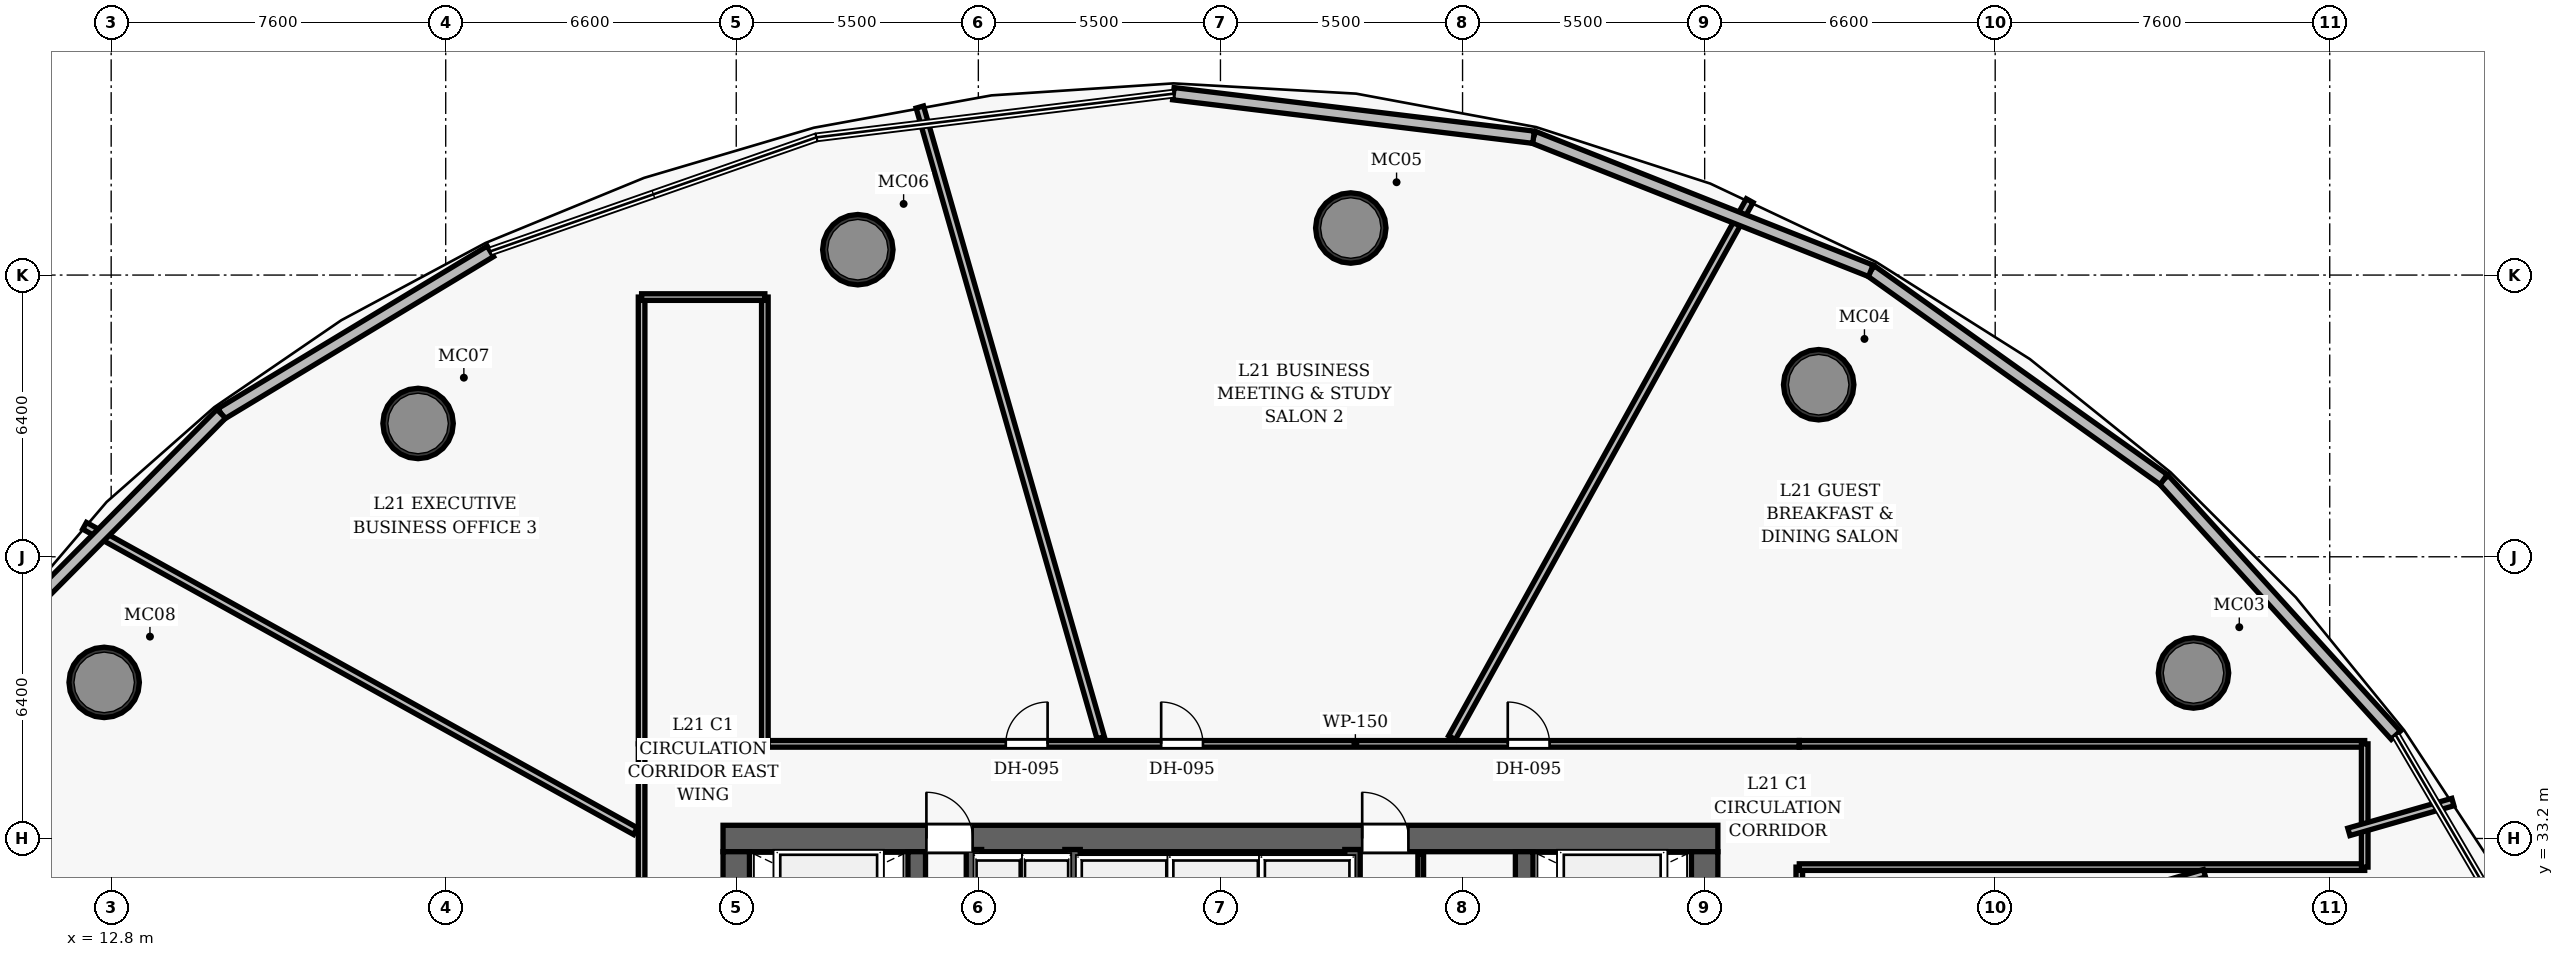
"""IFC4 building model, lengths in metres.
Left out: names, types, materials, properties, quantities, classifications, styles, units other than length and angle.
Written with IfcOpenShell. Run it as: python <this file> out.ifc"""

import sys

from ifc_helpers import new_model, si_unit, direction, frame, frame_2d, origin, origin_2d, place, context, subcontext, project, spatial, rectangle, hollow_circle, extrude, element, fill, save


model = new_model("IFC4")
c1 = context("Model", 3, precision=1e-05, world=origin(), true_north=direction((0.0, 1.0)))
c2 = subcontext(c1, "Body", "Model", "MODEL_VIEW")
j1 = project(units=[si_unit("LENGTHUNIT", "METRE"), si_unit("PLANEANGLEUNIT", "RADIAN")], contexts=[c1])
p1 = place(None, origin())
s1 = spatial("IfcSite", under=j1, at=p1, CompositionType="ELEMENT")
p2 = place(p1, origin())
s2 = spatial("IfcBuilding", under=s1, at=p2, CompositionType="ELEMENT")
p3 = place(p2, frame((0.0, 0.0, 90.4)))
s3 = spatial("IfcBuildingStorey", under=s2, at=p3, CompositionType="ELEMENT", Elevation=90.4)
p4 = place(p3, frame((26.7, 33.2, 0.0), z_axis=(0.0, 0.0, 1.0), x_axis=(1.0, 0.0, 0.0)))
e1 = element("IfcWall", 1, at=p4, inside=s3, PredefinedType="SHEAR", context=c2, shape_type="SweptSolid", body=[
    extrude(rectangle(XDim=22.6, YDim=0.6, at=frame_2d((11.3, 0.0))), origin(), (0.0, 0.0, 1.0), 3.5),
])
p5 = place(p4, frame((4.62, 0.0, 0.0)))
e2 = element("IfcOpeningElement", 2, at=p5, cuts=e1, PredefinedType="OPENING", context=c2, shape_type="SweptSolid", body=[
    extrude(rectangle(XDim=1.05, YDim=2.15, at=frame_2d((0.525, 1.075))), frame((0.0, 0.31, 0.0), z_axis=(0.0, -1.0, 0.0), x_axis=(1.0, 0.0, 0.0)), (0.0, 0.0, 1.0), 0.62),
])
p6 = place(p4, frame((14.52, 0.0, 0.0)))
e3 = element("IfcOpeningElement", 3, at=p6, cuts=e1, PredefinedType="OPENING", context=c2, shape_type="SweptSolid", body=[
    extrude(rectangle(XDim=1.05, YDim=2.15, at=frame_2d((0.525, 1.075))), frame((0.0, 0.31, 0.0), z_axis=(0.0, -1.0, 0.0), x_axis=(1.0, 0.0, 0.0)), (0.0, 0.0, 1.0), 0.62),
])
p7 = place(p3, frame((27.0, 19.1, 0.0), z_axis=(0.0, 0.0, 1.0), x_axis=(0.0, 1.0, 0.0)))
e4 = element("IfcWall", 4, at=p7, inside=s3, PredefinedType="SHEAR", context=c2, shape_type="SweptSolid", body=[
    extrude(rectangle(XDim=13.8, YDim=0.6, at=frame_2d((6.9, 0.0))), origin(), (0.0, 0.0, 1.0), 3.5),
])
p8 = place(p7, frame((8.2, 0.0, 0.0)))
e5 = element("IfcOpeningElement", 5, at=p8, cuts=e4, PredefinedType="OPENING", context=c2, shape_type="SweptSolid", body=[
    extrude(rectangle(XDim=1.05, YDim=2.15, at=frame_2d((0.525, 1.075))), frame((0.0, 0.31, 0.0), z_axis=(0.0, -1.0, 0.0), x_axis=(1.0, 0.0, 0.0)), (0.0, 0.0, 1.0), 0.62),
])
p9 = place(p3, frame((49.0, 19.1, 0.0), z_axis=(0.0, 0.0, 1.0), x_axis=(0.0, 1.0, 0.0)))
e6 = element("IfcWall", 6, at=p9, inside=s3, PredefinedType="SHEAR", context=c2, shape_type="SweptSolid", body=[
    extrude(rectangle(XDim=13.8, YDim=0.6, at=frame_2d((6.9, 0.0))), origin(), (0.0, 0.0, 1.0), 3.5),
])
p10 = place(p9, frame((8.2, 0.0, 0.0)))
e7 = element("IfcOpeningElement", 7, at=p10, cuts=e6, PredefinedType="OPENING", context=c2, shape_type="SweptSolid", body=[
    extrude(rectangle(XDim=1.05, YDim=2.15, at=frame_2d((0.525, 1.075))), frame((0.0, 0.31, 0.0), z_axis=(0.0, -1.0, 0.0), x_axis=(1.0, 0.0, 0.0)), (0.0, 0.0, 1.0), 0.62),
])
for number, where, z_axis, x_axis in (
    (8, (31.1, 19.1, 0.0), (0.0, 0.0, 1.0), (0.0, 1.0, 0.0)),
    (9, (44.9, 19.1, 0.0), (0.0, 0.0, 1.0), (0.0, 1.0, 0.0)),
):
    element("IfcWall", number, at=place(p3, frame(where, z_axis=z_axis, x_axis=x_axis)), inside=s3, PredefinedType="SHEAR", context=c2, shape_type="SweptSolid", body=[
        extrude(rectangle(XDim=13.8, YDim=0.4, at=frame_2d((6.9, 0.0))), origin(), (0.0, 0.0, 1.0), 3.5),
    ])
for number, where, z_axis, x_axis in (
    (10, (60.105, 36.96, 0.0), (0.0, 0.0, 1.0), (1.0, 0.0, 0.0)),
    (11, (51.59, 43.509, 0.0), (0.0, 0.0, 1.0), (1.0, 0.0, 0.0)),
    (12, (40.961, 47.069, 0.0), (0.0, 0.0, 1.0), (1.0, 0.0, 0.0)),
    (13, (29.762, 46.577, 0.0), (0.0, 0.0, 1.0), (1.0, 0.0, 0.0)),
    (14, (19.772, 42.629, 0.0), (0.0, 0.0, 1.0), (1.0, 0.0, 0.0)),
    (15, (12.641, 36.746, 0.0), (0.0, 0.0, 1.0), (1.0, 0.0, 0.0)),
):
    element("IfcColumn", number, at=place(p3, frame(where, z_axis=z_axis, x_axis=x_axis)), inside=s3, PredefinedType="COLUMN", context=c2, shape_type="SweptSolid", body=[
        extrude(hollow_circle(Radius=0.8, WallThickness=0.06, at=origin_2d()), origin(), (0.0, 0.0, 1.0), 3.5),
    ])
p11 = place(p3, frame((34.64, 26.69, 0.0), z_axis=(0.0, 0.0, 1.0), x_axis=(0.0, 1.0, 0.0)))
e16 = element("IfcWall", 16, at=p11, inside=s3, PredefinedType="SHEAR", context=c2, shape_type="SweptSolid", body=[
    extrude(rectangle(XDim=6.26, YDim=0.35, at=frame_2d((3.13, 0.0))), origin(), (0.0, 0.0, 1.0), 3.5),
])
p12 = place(p3, frame((32.4, 30.22, 0.0), z_axis=(0.0, 0.0, 1.0), x_axis=(0.0, 1.0, 0.0)))
e17 = element("IfcWall", 17, at=p12, inside=s3, PredefinedType="SHEAR", context=c2, shape_type="SweptSolid", body=[
    extrude(rectangle(XDim=2.73, YDim=0.35, at=frame_2d((1.365, 0.0))), origin(), (0.0, 0.0, 1.0), 2.6),
])
p13 = place(p3, frame((41.0, 30.87, 0.0), z_axis=(0.0, 0.0, 1.0), x_axis=(0.0, 1.0, 0.0)))
e18 = element("IfcWall", 18, at=p13, inside=s3, PredefinedType="SHEAR", context=c2, shape_type="SweptSolid", body=[
    extrude(rectangle(XDim=2.08, YDim=0.35, at=frame_2d((1.04, 0.0))), origin(), (0.0, 0.0, 1.0), 2.6),
])
p14 = place(p3, frame((42.55, 28.1, 0.0), z_axis=(0.0, 0.0, 1.0), x_axis=(0.0, 1.0, 0.0)))
e19 = element("IfcWall", 19, at=p14, inside=s3, PredefinedType="PARTITIONING", context=c2, shape_type="SweptSolid", body=[
    extrude(rectangle(XDim=4.75, YDim=0.13, at=frame_2d((2.375, 0.0))), origin(), (0.0, 0.0, 1.0), 2.6),
])
p15 = place(p14, frame((0.55, 0.0, 0.0)))
e20 = element("IfcOpeningElement", 20, at=p15, cuts=e19, PredefinedType="OPENING", context=c2, shape_type="SweptSolid", body=[
    extrude(rectangle(XDim=0.85, YDim=2.1, at=frame_2d((0.425, 1.05))), frame((0.0, 0.075, 0.0), z_axis=(0.0, -1.0, 0.0), x_axis=(1.0, 0.0, 0.0)), (0.0, 0.0, 1.0), 0.15),
])
p16 = place(p14, frame((2.9, 0.0, 0.0)))
e21 = element("IfcOpeningElement", 21, at=p16, cuts=e19, PredefinedType="OPENING", context=c2, shape_type="SweptSolid", body=[
    extrude(rectangle(XDim=0.85, YDim=2.1, at=frame_2d((0.425, 1.05))), frame((0.0, 0.075, 0.0), z_axis=(0.0, -1.0, 0.0), x_axis=(1.0, 0.0, 0.0)), (0.0, 0.0, 1.0), 0.15),
])
p17 = place(p3, frame((27.65, 35.35, 0.0), z_axis=(0.0, 0.0, 1.0), x_axis=(1.0, 0.0, 0.0)))
e22 = element("IfcWall", 22, at=p17, inside=s3, PredefinedType="PARTITIONING", context=c2, shape_type="SweptSolid", body=[
    extrude(rectangle(XDim=23.5, YDim=0.15, at=frame_2d((11.75, 0.0))), origin(), (0.0, 0.0, 1.0), 2.6),
])
p18 = place(p17, frame((16.877, 0.0, 0.0)))
e23 = element("IfcOpeningElement", 23, at=p18, cuts=e22, PredefinedType="OPENING", context=c2, shape_type="SweptSolid", body=[
    extrude(rectangle(XDim=0.95, YDim=2.15, at=frame_2d((0.475, 1.075))), frame((0.0, 0.085, 0.0), z_axis=(0.0, -1.0, 0.0), x_axis=(1.0, 0.0, 0.0)), (0.0, 0.0, 1.0), 0.17),
])
p19 = place(p17, frame((9.003, 0.0, 0.0)))
e24 = element("IfcOpeningElement", 24, at=p19, cuts=e22, PredefinedType="OPENING", context=c2, shape_type="SweptSolid", body=[
    extrude(rectangle(XDim=0.95, YDim=2.15, at=frame_2d((0.475, 1.075))), frame((0.0, 0.085, 0.0), z_axis=(0.0, -1.0, 0.0), x_axis=(1.0, 0.0, 0.0)), (0.0, 0.0, 1.0), 0.17),
])
p20 = place(p17, frame((5.473, 0.0, 0.0)))
e25 = element("IfcOpeningElement", 25, at=p20, cuts=e22, PredefinedType="OPENING", context=c2, shape_type="SweptSolid", body=[
    extrude(rectangle(XDim=0.95, YDim=2.15, at=frame_2d((0.475, 1.075))), frame((0.0, 0.085, 0.0), z_axis=(0.0, -1.0, 0.0), x_axis=(1.0, 0.0, 0.0)), (0.0, 0.0, 1.0), 0.17),
])
p21 = place(p3, frame((24.85, 19.45, 0.0), z_axis=(0.0, 0.0, 1.0), x_axis=(0.0, 1.0, 0.0)))
e26 = element("IfcWall", 26, at=p21, inside=s3, PredefinedType="PARTITIONING", context=c2, shape_type="SweptSolid", body=[
    extrude(rectangle(XDim=15.9, YDim=0.15, at=frame_2d((7.95, 0.0))), origin(), (0.0, 0.0, 1.0), 2.6),
])
p22 = place(p21, frame((7.852, 0.0, 0.0)))
e27 = element("IfcOpeningElement", 27, at=p22, cuts=e26, PredefinedType="OPENING", context=c2, shape_type="SweptSolid", body=[
    extrude(rectangle(XDim=0.95, YDim=2.15, at=frame_2d((0.475, 1.075))), frame((0.0, 0.085, 0.0), z_axis=(0.0, -1.0, 0.0), x_axis=(1.0, 0.0, 0.0)), (0.0, 0.0, 1.0), 0.17),
])
p23 = place(p3, frame((51.15, 16.65, 0.0), z_axis=(0.0, 0.0, 1.0), x_axis=(0.0, 1.0, 0.0)))
e28 = element("IfcWall", 28, at=p23, inside=s3, PredefinedType="PARTITIONING", context=c2, shape_type="SweptSolid", body=[
    extrude(rectangle(XDim=15.9, YDim=0.15, at=frame_2d((7.95, 0.0))), origin(), (0.0, 0.0, 1.0), 2.6),
])
p24 = place(p23, frame((7.098, 0.0, 0.0)))
e29 = element("IfcOpeningElement", 29, at=p24, cuts=e28, PredefinedType="OPENING", context=c2, shape_type="SweptSolid", body=[
    extrude(rectangle(XDim=0.95, YDim=2.15, at=frame_2d((0.475, 1.075))), frame((0.0, 0.085, 0.0), z_axis=(0.0, -1.0, 0.0), x_axis=(1.0, 0.0, 0.0)), (0.0, 0.0, 1.0), 0.17),
])
for number, where, z_axis, x_axis in (
    (30, (51.15, 35.35, 0.0), (0.0, 0.0, 1.0), (1.0, 0.0, 0.0)),
    (31, (51.15, 32.55, 0.0), (0.0, 0.0, 1.0), (1.0, 0.0, 0.0)),
):
    element("IfcWall", number, at=place(p3, frame(where, z_axis=z_axis, x_axis=x_axis)), inside=s3, PredefinedType="PARTITIONING", context=c2, shape_type="SweptSolid", body=[
        extrude(rectangle(XDim=12.845, YDim=0.15, at=frame_2d((6.422, 0.0))), origin(), (0.0, 0.0, 1.0), 2.6),
    ])
p25 = place(p3, frame((63.995, 32.55, 0.0), z_axis=(0.0, 0.0, 1.0), x_axis=(0.0, 1.0, 0.0)))
e32 = element("IfcWall", 32, at=p25, inside=s3, PredefinedType="PARTITIONING", context=c2, shape_type="SweptSolid", body=[
    extrude(rectangle(XDim=2.8, YDim=0.15, at=frame_2d((1.4, 0.0))), origin(), (0.0, 0.0, 1.0), 2.6),
])
for number, where, z_axis, x_axis in (
    (33, (24.85, 35.35, 0.0), (0.0, 0.0, 1.0), (0.0, 1.0, 0.0)),
    (34, (27.65, 35.35, 0.0), (0.0, 0.0, 1.0), (0.0, 1.0, 0.0)),
):
    element("IfcWall", number, at=place(p3, frame(where, z_axis=z_axis, x_axis=x_axis)), inside=s3, PredefinedType="PARTITIONING", context=c2, shape_type="SweptSolid", body=[
        extrude(rectangle(XDim=10.15, YDim=0.15, at=frame_2d((5.075, 0.0))), origin(), (0.0, 0.0, 1.0), 2.6),
    ])
p26 = place(p3, frame((24.85, 45.5, 0.0), z_axis=(0.0, 0.0, 1.0), x_axis=(1.0, 0.0, 0.0)))
e35 = element("IfcWall", 35, at=p26, inside=s3, PredefinedType="PARTITIONING", context=c2, shape_type="SweptSolid", body=[
    extrude(rectangle(XDim=2.8, YDim=0.15, at=frame_2d((1.4, 0.0))), origin(), (0.0, 0.0, 1.0), 2.6),
])
p27 = place(p3, frame((51.29, 29.811, 0.0), z_axis=(0.0, 0.0, 1.0), x_axis=(0.961261668066, 0.275637453019, 0.0)))
e36 = element("IfcWall", 36, at=p27, inside=s3, PredefinedType="PARTITIONING", context=c2, shape_type="SweptSolid", body=[
    extrude(rectangle(XDim=9.429, YDim=0.175, at=frame_2d((4.715, 0.0))), origin(), (0.0, 0.0, 1.0), 2.6),
])
p28 = place(p3, frame((63.634, 33.351, 0.0), z_axis=(0.0, 0.0, 1.0), x_axis=(0.961261224471, 0.275639000014, 0.0)))
e37 = element("IfcWall", 37, at=p28, inside=s3, PredefinedType="PARTITIONING", context=c2, shape_type="SweptSolid", body=[
    extrude(rectangle(XDim=2.459, YDim=0.175, at=frame_2d((1.229, 0.0))), origin(), (0.0, 0.0, 1.0), 2.6),
])
p29 = place(p3, frame((43.26, 35.49, 0.0), z_axis=(0.0, 0.0, 1.0), x_axis=(0.484809077535, 0.874620007969, 0.0)))
e38 = element("IfcWall", 38, at=p29, inside=s3, PredefinedType="PARTITIONING", context=c2, shape_type="SweptSolid", body=[
    extrude(rectangle(XDim=13.95, YDim=0.175, at=frame_2d((6.975, 0.0))), origin(), (0.0, 0.0, 1.0), 2.6),
])
p30 = place(p3, frame((35.279, 35.49, 0.0), z_axis=(0.0, 0.0, 1.0), x_axis=(-0.275642608392, 0.961260189771, 0.0)))
e39 = element("IfcWall", 39, at=p30, inside=s3, PredefinedType="PARTITIONING", context=c2, shape_type="SweptSolid", body=[
    extrude(rectangle(XDim=14.905, YDim=0.175, at=frame_2d((7.452, 0.0))), origin(), (0.0, 0.0, 1.0), 2.6),
])
p31 = place(p3, frame((24.71, 33.367, 0.0), z_axis=(0.0, 0.0, 1.0), x_axis=(-0.874610832143, 0.484825630819, 0.0)))
e40 = element("IfcWall", 40, at=p31, inside=s3, PredefinedType="PARTITIONING", context=c2, shape_type="SweptSolid", body=[
    extrude(rectangle(XDim=14.308, YDim=0.175, at=frame_2d((7.154, 0.0))), origin(), (0.0, 0.0, 1.0), 2.6),
])
p32 = place(p3, frame((59.429, 41.354, 0.0), z_axis=(0.0, 0.0, 1.0), x_axis=(0.672142867196, -0.740421478671, 0.0)))
e41 = element("IfcWall", 41, at=p32, inside=s3, PredefinedType="SOLIDWALL", context=c2, shape_type="SweptSolid", body=[
    extrude(rectangle(XDim=7.845, YDim=0.28, at=frame_2d((3.922, 0.0))), origin(), (0.0, 0.0, 1.0), 3.25),
])
p33 = place(p3, frame((52.775, 46.097, 0.0), z_axis=(0.0, 0.0, 1.0), x_axis=(0.814352796441, -0.580370160267, 0.0)))
e42 = element("IfcWall", 42, at=p33, inside=s3, PredefinedType="SOLIDWALL", context=c2, shape_type="SweptSolid", body=[
    extrude(rectangle(XDim=8.171, YDim=0.28, at=frame_2d((4.085, 0.0))), origin(), (0.0, 0.0, 1.0), 3.25),
])
p34 = place(p3, frame((45.113, 49.131, 0.0), z_axis=(0.0, 0.0, 1.0), x_axis=(0.929733940002, -0.368231993189, 0.0)))
e43 = element("IfcWall", 43, at=p34, inside=s3, PredefinedType="SOLIDWALL", context=c2, shape_type="SweptSolid", body=[
    extrude(rectangle(XDim=8.241, YDim=0.28, at=frame_2d((4.121, 0.0))), origin(), (0.0, 0.0, 1.0), 3.25),
])
p35 = place(p3, frame((36.931, 50.12, 0.0), z_axis=(0.0, 0.0, 1.0), x_axis=(0.992773297887, -0.120004912414, 0.0)))
e44 = element("IfcWall", 44, at=p35, inside=s3, PredefinedType="SOLIDWALL", context=c2, shape_type="SweptSolid", body=[
    extrude(rectangle(XDim=8.241, YDim=0.28, at=frame_2d((4.121, 0.0))), origin(), (0.0, 0.0, 1.0), 3.25),
])
p36 = place(p3, frame((15.3, 42.848, 0.0), z_axis=(0.0, 0.0, 1.0), x_axis=(0.856129783559, 0.51676086704, 0.0)))
e45 = element("IfcWall", 45, at=p36, inside=s3, PredefinedType="SOLIDWALL", context=c2, shape_type="SweptSolid", body=[
    extrude(rectangle(XDim=7.143, YDim=0.28, at=frame_2d((3.571, 0.0))), origin(), (0.0, 0.0, 1.0), 3.25),
])
p37 = place(p3, frame((10.925, 38.438, 0.0), z_axis=(0.0, 0.0, 1.0), x_axis=(0.704291107344, 0.709911287497, 0.0)))
e46 = element("IfcWall", 46, at=p37, inside=s3, PredefinedType="SOLIDWALL", context=c2, shape_type="SweptSolid", body=[
    extrude(rectangle(XDim=6.212, YDim=0.28, at=frame_2d((3.106, 0.0))), origin(), (0.0, 0.0, 1.0), 3.25),
])
p38 = place(p5, origin())
e47 = element("IfcDoor", 47, at=p38, inside=s3, OperationType="SINGLE_SWING_LEFT", PredefinedType="DOOR", context=c2, shape_type="SweptSolid", body=[
    extrude(rectangle(XDim=1.05, YDim=2.15, at=frame_2d((0.525, 1.075))), frame((0.0, 0.025, 0.0), z_axis=(0.0, -1.0, 0.0), x_axis=(1.0, 0.0, 0.0)), (0.0, 0.0, 1.0), 0.05),
])
fill(e2, e47)
p39 = place(p6, origin())
e48 = element("IfcDoor", 48, at=p39, inside=s3, OperationType="SINGLE_SWING_LEFT", PredefinedType="DOOR", context=c2, shape_type="SweptSolid", body=[
    extrude(rectangle(XDim=1.05, YDim=2.15, at=frame_2d((0.525, 1.075))), frame((0.0, 0.025, 0.0), z_axis=(0.0, -1.0, 0.0), x_axis=(1.0, 0.0, 0.0)), (0.0, 0.0, 1.0), 0.05),
])
fill(e3, e48)
p40 = place(p18, origin())
e49 = element("IfcDoor", 49, at=p40, inside=s3, OperationType="SINGLE_SWING_LEFT", PredefinedType="DOOR", context=c2, shape_type="SweptSolid", body=[
    extrude(rectangle(XDim=0.95, YDim=2.15, at=frame_2d((0.475, 1.075))), frame((0.0, 0.025, 0.0), z_axis=(0.0, -1.0, 0.0), x_axis=(1.0, 0.0, 0.0)), (0.0, 0.0, 1.0), 0.05),
])
fill(e23, e49)
p41 = place(p19, origin())
e50 = element("IfcDoor", 50, at=p41, inside=s3, OperationType="SINGLE_SWING_LEFT", PredefinedType="DOOR", context=c2, shape_type="SweptSolid", body=[
    extrude(rectangle(XDim=0.95, YDim=2.15, at=frame_2d((0.475, 1.075))), frame((0.0, 0.025, 0.0), z_axis=(0.0, -1.0, 0.0), x_axis=(1.0, 0.0, 0.0)), (0.0, 0.0, 1.0), 0.05),
])
fill(e24, e50)
p42 = place(p20, origin())
e51 = element("IfcDoor", 51, at=p42, inside=s3, OperationType="SINGLE_SWING_RIGHT", PredefinedType="DOOR", context=c2, shape_type="SweptSolid", body=[
    extrude(rectangle(XDim=0.95, YDim=2.15, at=frame_2d((0.475, 1.075))), frame((0.0, 0.025, 0.0), z_axis=(0.0, -1.0, 0.0), x_axis=(1.0, 0.0, 0.0)), (0.0, 0.0, 1.0), 0.05),
])
fill(e25, e51)
save(model, sys.argv[1])
